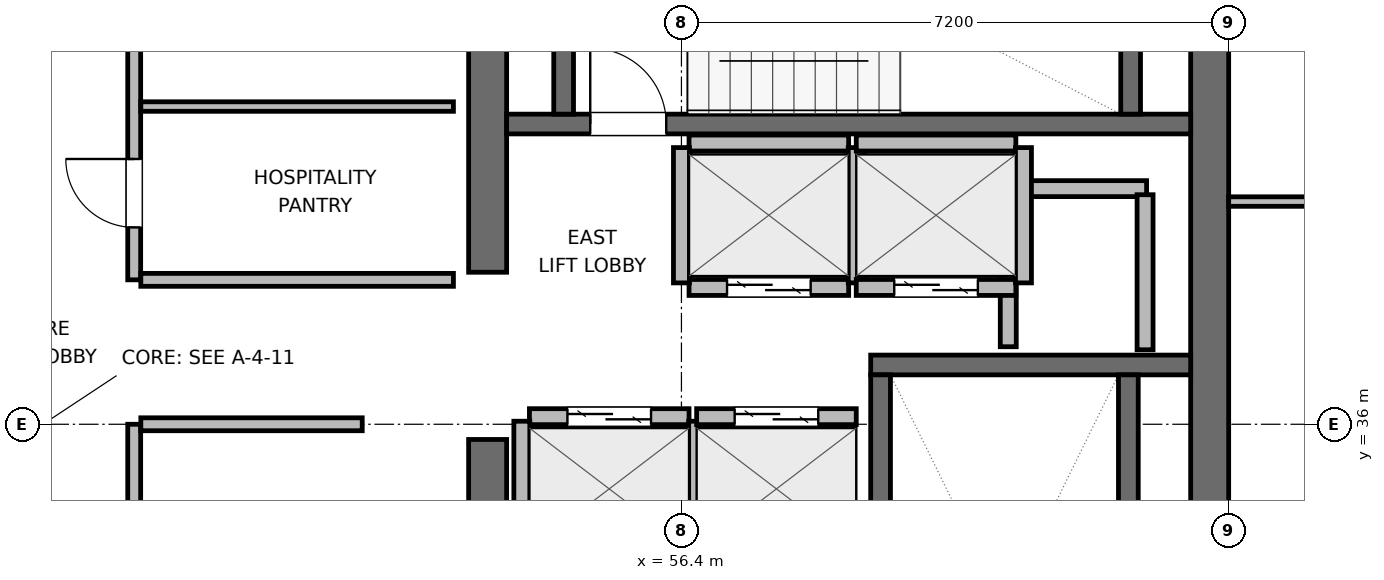
"""IFC4 building model, lengths in metres.
Left out: names, types, materials, properties, quantities, classifications, styles, units other than length and angle.
Written with IfcOpenShell. Run it as: python <this file> out.ifc"""

import sys

from ifc_helpers import new_model, si_unit, direction, frame, frame_2d, origin, place, context, subcontext, project, spatial, rectangle, extrude, element, fill, save


model = new_model("IFC4")
c1 = context("Model", 3, precision=1e-05, world=origin(), true_north=direction((0.0, 1.0)))
c2 = subcontext(c1, "Body", "Model", "MODEL_VIEW")
j1 = project(units=[si_unit("LENGTHUNIT", "METRE"), si_unit("PLANEANGLEUNIT", "RADIAN")], contexts=[c1])
p1 = place(None, origin())
s1 = spatial("IfcSite", under=j1, at=p1, CompositionType="ELEMENT")
p2 = place(p1, origin())
s2 = spatial("IfcBuilding", under=s1, at=p2, CompositionType="ELEMENT")
p3 = place(p2, frame((0.0, 0.0, 274.5)))
s3 = spatial("IfcBuildingStorey", under=s2, at=p3, CompositionType="ELEMENT", Elevation=274.5)
p4 = place(p3, frame((53.85, 27.85, 0.0), z_axis=(0.0, 0.0, 1.0), x_axis=(0.0, 1.0, 0.0)))
e1 = element("IfcWall", 1, at=p4, inside=s3, PredefinedType="SHEAR", context=c2, shape_type="SweptSolid", body=[
    extrude(rectangle(XDim=7.95, YDim=0.5, at=frame_2d((3.975, 0.0))), origin(), (0.0, 0.0, 1.0), 3.9),
])
p5 = place(p3, frame((53.85, 38.0, 0.0), z_axis=(0.0, 0.0, 1.0), x_axis=(0.0, 1.0, 0.0)))
e2 = element("IfcWall", 2, at=p5, inside=s3, PredefinedType="SHEAR", context=c2, shape_type="SweptSolid", body=[
    extrude(rectangle(XDim=6.15, YDim=0.5, at=frame_2d((3.075, 0.0))), origin(), (0.0, 0.0, 1.0), 3.9),
])
p6 = place(p3, frame((63.35, 27.6, 0.0), z_axis=(0.0, 0.0, 1.0), x_axis=(0.0, 1.0, 0.0)))
e3 = element("IfcWall", 3, at=p6, inside=s3, PredefinedType="SHEAR", context=c2, shape_type="SweptSolid", body=[
    extrude(rectangle(XDim=16.8, YDim=0.5, at=frame_2d((8.4, 0.0))), origin(), (0.0, 0.0, 1.0), 3.9),
])
p7 = place(p3, frame((58.89, 36.78, 0.0), z_axis=(0.0, 0.0, 1.0), x_axis=(1.0, 0.0, 0.0)))
e4 = element("IfcWall", 4, at=p7, inside=s3, PredefinedType="SHEAR", context=c2, shape_type="SweptSolid", body=[
    extrude(rectangle(XDim=4.21, YDim=0.26, at=frame_2d((2.105, 0.0))), origin(), (0.0, 0.0, 1.0), 3.9),
])
p8 = place(p3, frame((59.02, 29.05, 0.0), z_axis=(0.0, 0.0, 1.0), x_axis=(0.0, 1.0, 0.0)))
e5 = element("IfcWall", 5, at=p8, inside=s3, PredefinedType="SHEAR", context=c2, shape_type="SweptSolid", body=[
    extrude(rectangle(XDim=7.6, YDim=0.26, at=frame_2d((3.8, 0.0))), origin(), (0.0, 0.0, 1.0), 3.9),
])
p9 = place(p8, frame((0.3, 0.0, 0.0)))
e6 = element("IfcOpeningElement", 6, at=p9, cuts=e5, PredefinedType="OPENING", context=c2, shape_type="SweptSolid", body=[
    extrude(rectangle(XDim=1.0, YDim=2.04, at=frame_2d((0.5, 1.02))), frame((0.0, 0.14, 0.0), z_axis=(0.0, -1.0, 0.0), x_axis=(1.0, 0.0, 0.0)), (0.0, 0.0, 1.0), 0.28),
])
p10 = place(p3, frame((62.28, 29.05, 0.0), z_axis=(0.0, 0.0, 1.0), x_axis=(0.0, 1.0, 0.0)))
e7 = element("IfcWall", 7, at=p10, inside=s3, PredefinedType="SHEAR", context=c2, shape_type="SweptSolid", body=[
    extrude(rectangle(XDim=7.6, YDim=0.26, at=frame_2d((3.8, 0.0))), origin(), (0.0, 0.0, 1.0), 3.9),
])
p11 = place(p3, frame((54.1, 39.95, 0.0), z_axis=(0.0, 0.0, 1.0), x_axis=(1.0, 0.0, 0.0)))
e8 = element("IfcWall", 8, at=p11, inside=s3, PredefinedType="SHEAR", context=c2, shape_type="SweptSolid", body=[
    extrude(rectangle(XDim=9.0, YDim=0.26, at=frame_2d((4.5, 0.0))), origin(), (0.0, 0.0, 1.0), 3.9),
])
p12 = place(p11, frame((1.1, 0.0, 0.0)))
e9 = element("IfcOpeningElement", 9, at=p12, cuts=e8, PredefinedType="OPENING", context=c2, shape_type="SweptSolid", body=[
    extrude(rectangle(XDim=1.0, YDim=2.04, at=frame_2d((0.5, 1.02))), frame((0.0, 0.14, 0.0), z_axis=(0.0, -1.0, 0.0), x_axis=(1.0, 0.0, 0.0)), (0.0, 0.0, 1.0), 0.28),
])
for number, where, z_axis, x_axis in (
    (10, (54.85, 40.08, 0.0), (0.0, 0.0, 1.0), (0.0, 1.0, 0.0)),
    (11, (62.31, 40.08, 0.0), (0.0, 0.0, 1.0), (0.0, 1.0, 0.0)),
):
    element("IfcWall", number, at=place(p3, frame(where, z_axis=z_axis, x_axis=x_axis)), inside=s3, PredefinedType="SHEAR", context=c2, shape_type="SweptSolid", body=[
        extrude(rectangle(XDim=2.94, YDim=0.26, at=frame_2d((1.47, 0.0))), origin(), (0.0, 0.0, 1.0), 3.9),
    ])
p13 = place(p3, frame((60.72, 39.1, 0.0), z_axis=(0.0, 0.0, 1.0), x_axis=(1.0, 0.0, 0.0)))
e12 = element("IfcWall", 12, at=p13, inside=s3, PredefinedType="PARTITIONING", context=c2, shape_type="SweptSolid", body=[
    extrude(rectangle(XDim=1.8, YDim=0.21, at=frame_2d((0.9, 0.0))), origin(), (0.0, 0.0, 1.0), 3.68),
])
p14 = place(p3, frame((60.7, 37.02, 0.0), z_axis=(0.0, 0.0, 1.0), x_axis=(0.0, 1.0, 0.0)))
e13 = element("IfcWall", 13, at=p14, inside=s3, PredefinedType="PARTITIONING", context=c2, shape_type="SweptSolid", body=[
    extrude(rectangle(XDim=1.96, YDim=0.21, at=frame_2d((0.98, 0.0))), origin(), (0.0, 0.0, 1.0), 3.68),
])
p15 = place(p3, frame((62.5, 36.98, 0.0), z_axis=(0.0, 0.0, 1.0), x_axis=(0.0, 1.0, 0.0)))
e14 = element("IfcWall", 14, at=p15, inside=s3, PredefinedType="PARTITIONING", context=c2, shape_type="SweptSolid", body=[
    extrude(rectangle(XDim=2.04, YDim=0.21, at=frame_2d((1.02, 0.0))), origin(), (0.0, 0.0, 1.0), 3.68),
])
p16 = place(p3, frame((54.4, 36.1, 0.0), z_axis=(0.0, 0.0, 1.0), x_axis=(1.0, 0.0, 0.0)))
e15 = element("IfcWall", 15, at=p16, inside=s3, PredefinedType="PARTITIONING", context=c2, shape_type="SweptSolid", body=[
    extrude(rectangle(XDim=2.1, YDim=0.21, at=frame_2d((1.05, 0.0))), origin(), (0.0, 0.0, 1.0), 3.68),
])
p17 = place(p16, frame((0.5, 0.0, 0.0)))
e16 = element("IfcOpeningElement", 16, at=p17, cuts=e15, PredefinedType="OPENING", context=c2, shape_type="SweptSolid", body=[
    extrude(rectangle(XDim=1.1, YDim=2.04, at=frame_2d((0.55, 1.02))), frame((0.0, 0.115, 0.0), z_axis=(0.0, -1.0, 0.0), x_axis=(1.0, 0.0, 0.0)), (0.0, 0.0, 1.0), 0.23),
])
for number, where, z_axis, x_axis in (
    (17, (54.3, 34.26, 0.0), (0.0, 0.0, 1.0), (0.0, 1.0, 0.0)),
    (18, (56.6, 34.26, 0.0), (0.0, 0.0, 1.0), (0.0, 1.0, 0.0)),
):
    element("IfcWall", number, at=place(p3, frame(where, z_axis=z_axis, x_axis=x_axis)), inside=s3, PredefinedType="PARTITIONING", context=c2, shape_type="SweptSolid", body=[
        extrude(rectangle(XDim=1.78, YDim=0.21, at=frame_2d((0.89, 0.0))), origin(), (0.0, 0.0, 1.0), 3.68),
    ])
p18 = place(p3, frame((56.6, 36.1, 0.0), z_axis=(0.0, 0.0, 1.0), x_axis=(1.0, 0.0, 0.0)))
e19 = element("IfcWall", 19, at=p18, inside=s3, PredefinedType="PARTITIONING", context=c2, shape_type="SweptSolid", body=[
    extrude(rectangle(XDim=2.1, YDim=0.21, at=frame_2d((1.05, 0.0))), origin(), (0.0, 0.0, 1.0), 3.68),
])
p19 = place(p18, frame((0.5, 0.0, 0.0)))
e20 = element("IfcOpeningElement", 20, at=p19, cuts=e19, PredefinedType="OPENING", context=c2, shape_type="SweptSolid", body=[
    extrude(rectangle(XDim=1.1, YDim=2.04, at=frame_2d((0.55, 1.02))), frame((0.0, 0.115, 0.0), z_axis=(0.0, -1.0, 0.0), x_axis=(1.0, 0.0, 0.0)), (0.0, 0.0, 1.0), 0.23),
])
p20 = place(p3, frame((56.5, 37.8, 0.0), z_axis=(0.0, 0.0, 1.0), x_axis=(1.0, 0.0, 0.0)))
e21 = element("IfcWall", 21, at=p20, inside=s3, PredefinedType="PARTITIONING", context=c2, shape_type="SweptSolid", body=[
    extrude(rectangle(XDim=2.1, YDim=0.21, at=frame_2d((1.05, 0.0))), origin(), (0.0, 0.0, 1.0), 3.68),
])
p21 = place(p20, frame((0.5, 0.0, 0.0)))
e22 = element("IfcOpeningElement", 22, at=p21, cuts=e21, PredefinedType="OPENING", context=c2, shape_type="SweptSolid", body=[
    extrude(rectangle(XDim=1.1, YDim=2.04, at=frame_2d((0.55, 1.02))), frame((0.0, 0.115, 0.0), z_axis=(0.0, -1.0, 0.0), x_axis=(1.0, 0.0, 0.0)), (0.0, 0.0, 1.0), 0.23),
])
p22 = place(p3, frame((56.5, 39.7, 0.0), z_axis=(0.0, 0.0, 1.0), x_axis=(1.0, 0.0, 0.0)))
e23 = element("IfcWall", 23, at=p22, inside=s3, PredefinedType="PARTITIONING", context=c2, shape_type="SweptSolid", body=[
    extrude(rectangle(XDim=2.1, YDim=0.21, at=frame_2d((1.05, 0.0))), origin(), (0.0, 0.0, 1.0), 3.68),
])
for number, where, z_axis, x_axis in (
    (24, (56.4, 37.86, 0.0), (0.0, 0.0, 1.0), (0.0, 1.0, 0.0)),
    (25, (58.7, 37.86, 0.0), (0.0, 0.0, 1.0), (0.0, 1.0, 0.0)),
):
    element("IfcWall", number, at=place(p3, frame(where, z_axis=z_axis, x_axis=x_axis)), inside=s3, PredefinedType="PARTITIONING", context=c2, shape_type="SweptSolid", body=[
        extrude(rectangle(XDim=1.78, YDim=0.21, at=frame_2d((0.89, 0.0))), origin(), (0.0, 0.0, 1.0), 3.68),
    ])
p23 = place(p3, frame((58.7, 37.8, 0.0), z_axis=(0.0, 0.0, 1.0), x_axis=(1.0, 0.0, 0.0)))
e26 = element("IfcWall", 26, at=p23, inside=s3, PredefinedType="PARTITIONING", context=c2, shape_type="SweptSolid", body=[
    extrude(rectangle(XDim=2.1, YDim=0.21, at=frame_2d((1.05, 0.0))), origin(), (0.0, 0.0, 1.0), 3.68),
])
p24 = place(p23, frame((0.5, 0.0, 0.0)))
e27 = element("IfcOpeningElement", 27, at=p24, cuts=e26, PredefinedType="OPENING", context=c2, shape_type="SweptSolid", body=[
    extrude(rectangle(XDim=1.1, YDim=2.04, at=frame_2d((0.55, 1.02))), frame((0.0, 0.115, 0.0), z_axis=(0.0, -1.0, 0.0), x_axis=(1.0, 0.0, 0.0)), (0.0, 0.0, 1.0), 0.23),
])
p25 = place(p3, frame((58.7, 39.7, 0.0), z_axis=(0.0, 0.0, 1.0), x_axis=(1.0, 0.0, 0.0)))
e28 = element("IfcWall", 28, at=p25, inside=s3, PredefinedType="PARTITIONING", context=c2, shape_type="SweptSolid", body=[
    extrude(rectangle(XDim=2.1, YDim=0.21, at=frame_2d((1.05, 0.0))), origin(), (0.0, 0.0, 1.0), 3.68),
])
p26 = place(p3, frame((60.9, 37.86, 0.0), z_axis=(0.0, 0.0, 1.0), x_axis=(0.0, 1.0, 0.0)))
e29 = element("IfcWall", 29, at=p26, inside=s3, PredefinedType="PARTITIONING", context=c2, shape_type="SweptSolid", body=[
    extrude(rectangle(XDim=1.78, YDim=0.21, at=frame_2d((0.89, 0.0))), origin(), (0.0, 0.0, 1.0), 3.68),
])
p27 = place(p3, frame((49.2, 32.6, 0.0), z_axis=(0.0, 0.0, 1.0), x_axis=(0.0, 1.0, 0.0)))
e30 = element("IfcWall", 30, at=p27, inside=s3, PredefinedType="PARTITIONING", context=c2, shape_type="SweptSolid", body=[
    extrude(rectangle(XDim=3.4, YDim=0.17, at=frame_2d((1.7, 0.0))), origin(), (0.0, 0.0, 1.0), 3.68),
])
p28 = place(p27, frame((0.638, 0.0, 0.0)))
e31 = element("IfcOpeningElement", 31, at=p28, cuts=e30, PredefinedType="OPENING", context=c2, shape_type="SweptSolid", body=[
    extrude(rectangle(XDim=0.9, YDim=2.02, at=frame_2d((0.45, 1.01))), frame((0.0, 0.095, 0.0), z_axis=(0.0, -1.0, 0.0), x_axis=(1.0, 0.0, 0.0)), (0.0, 0.0, 1.0), 0.19),
])
p29 = place(p3, frame((49.287, 36.0, 0.0), z_axis=(0.0, 0.0, 1.0), x_axis=(1.0, 0.0, 0.0)))
e32 = element("IfcWall", 32, at=p29, inside=s3, PredefinedType="PARTITIONING", context=c2, shape_type="SweptSolid", body=[
    extrude(rectangle(XDim=2.913, YDim=0.17, at=frame_2d((1.457, 0.0))), origin(), (0.0, 0.0, 1.0), 3.68),
])
p30 = place(p3, frame((49.2, 37.9, 0.0), z_axis=(0.0, 0.0, 1.0), x_axis=(0.0, 1.0, 0.0)))
e33 = element("IfcWall", 33, at=p30, inside=s3, PredefinedType="PARTITIONING", context=c2, shape_type="SweptSolid", body=[
    extrude(rectangle(XDim=6.0, YDim=0.17, at=frame_2d((3.0, 0.0))), origin(), (0.0, 0.0, 1.0), 3.68),
])
p31 = place(p30, frame((0.69, 0.0, 0.0)))
e34 = element("IfcOpeningElement", 34, at=p31, cuts=e33, PredefinedType="OPENING", context=c2, shape_type="SweptSolid", body=[
    extrude(rectangle(XDim=0.9, YDim=2.02, at=frame_2d((0.45, 1.01))), frame((0.0, 0.095, 0.0), z_axis=(0.0, -1.0, 0.0), x_axis=(1.0, 0.0, 0.0)), (0.0, 0.0, 1.0), 0.19),
])
p32 = place(p30, frame((3.69, 0.0, 0.0)))
e35 = element("IfcOpeningElement", 35, at=p32, cuts=e33, PredefinedType="OPENING", context=c2, shape_type="SweptSolid", body=[
    extrude(rectangle(XDim=0.9, YDim=2.02, at=frame_2d((0.45, 1.01))), frame((0.0, 0.095, 0.0), z_axis=(0.0, -1.0, 0.0), x_axis=(1.0, 0.0, 0.0)), (0.0, 0.0, 1.0), 0.19),
])
p33 = place(p3, frame((49.287, 37.9, 0.0), z_axis=(0.0, 0.0, 1.0), x_axis=(1.0, 0.0, 0.0)))
e36 = element("IfcWall", 36, at=p33, inside=s3, PredefinedType="PARTITIONING", context=c2, shape_type="SweptSolid", body=[
    extrude(rectangle(XDim=4.113, YDim=0.17, at=frame_2d((2.056, 0.0))), origin(), (0.0, 0.0, 1.0), 3.68),
])
p34 = place(p3, frame((49.287, 40.18, 0.0), z_axis=(0.0, 0.0, 1.0), x_axis=(1.0, 0.0, 0.0)))
e37 = element("IfcWall", 37, at=p34, inside=s3, PredefinedType="PARTITIONING", context=c2, shape_type="SweptSolid", body=[
    extrude(rectangle(XDim=4.113, YDim=0.125, at=frame_2d((2.056, 0.0))), origin(), (0.0, 0.0, 1.0), 3.68),
])
p35 = place(p3, frame((63.6, 38.93, 0.0), z_axis=(0.0, 0.0, 1.0), x_axis=(1.0, 0.0, 0.0)))
e38 = element("IfcWall", 38, at=p35, inside=s3, PredefinedType="PARTITIONING", context=c2, shape_type="SweptSolid", body=[
    extrude(rectangle(XDim=4.845, YDim=0.125, at=frame_2d((2.422, 0.0))), origin(), (0.0, 0.0, 1.0), 3.68),
])
p36 = place(p35, frame((2.1, 0.0, 0.0)))
e39 = element("IfcOpeningElement", 39, at=p36, cuts=e38, PredefinedType="OPENING", context=c2, shape_type="SweptSolid", body=[
    extrude(rectangle(XDim=0.9, YDim=2.02, at=frame_2d((0.45, 1.01))), frame((0.0, 0.073, 0.0), z_axis=(0.0, -1.0, 0.0), x_axis=(1.0, 0.0, 0.0)), (0.0, 0.0, 1.0), 0.145),
])
p37 = place(p12, origin())
e40 = element("IfcDoor", 40, at=p37, inside=s3, OperationType="SINGLE_SWING_LEFT", PredefinedType="DOOR", context=c2, shape_type="SweptSolid", body=[
    extrude(rectangle(XDim=1.0, YDim=2.04, at=frame_2d((0.5, 1.02))), frame((0.0, 0.025, 0.0), z_axis=(0.0, -1.0, 0.0), x_axis=(1.0, 0.0, 0.0)), (0.0, 0.0, 1.0), 0.05),
])
fill(e9, e40)
p38 = place(p17, origin())
e41 = element("IfcDoor", 41, at=p38, inside=s3, OperationType="DOUBLE_DOOR_SLIDING", PredefinedType="DOOR", context=c2, shape_type="SweptSolid", body=[
    extrude(rectangle(XDim=1.1, YDim=2.04, at=frame_2d((0.55, 1.02))), frame((0.0, 0.025, 0.0), z_axis=(0.0, -1.0, 0.0), x_axis=(1.0, 0.0, 0.0)), (0.0, 0.0, 1.0), 0.05),
])
fill(e16, e41)
p39 = place(p19, origin())
e42 = element("IfcDoor", 42, at=p39, inside=s3, OperationType="DOUBLE_DOOR_SLIDING", PredefinedType="DOOR", context=c2, shape_type="SweptSolid", body=[
    extrude(rectangle(XDim=1.1, YDim=2.04, at=frame_2d((0.55, 1.02))), frame((0.0, 0.025, 0.0), z_axis=(0.0, -1.0, 0.0), x_axis=(1.0, 0.0, 0.0)), (0.0, 0.0, 1.0), 0.05),
])
fill(e20, e42)
p40 = place(p21, origin())
e43 = element("IfcDoor", 43, at=p40, inside=s3, OperationType="DOUBLE_DOOR_SLIDING", PredefinedType="DOOR", context=c2, shape_type="SweptSolid", body=[
    extrude(rectangle(XDim=1.1, YDim=2.04, at=frame_2d((0.55, 1.02))), frame((0.0, 0.025, 0.0), z_axis=(0.0, -1.0, 0.0), x_axis=(1.0, 0.0, 0.0)), (0.0, 0.0, 1.0), 0.05),
])
fill(e22, e43)
p41 = place(p24, origin())
e44 = element("IfcDoor", 44, at=p41, inside=s3, OperationType="DOUBLE_DOOR_SLIDING", PredefinedType="DOOR", context=c2, shape_type="SweptSolid", body=[
    extrude(rectangle(XDim=1.1, YDim=2.04, at=frame_2d((0.55, 1.02))), frame((0.0, 0.025, 0.0), z_axis=(0.0, -1.0, 0.0), x_axis=(1.0, 0.0, 0.0)), (0.0, 0.0, 1.0), 0.05),
])
fill(e27, e44)
p42 = place(p31, origin())
e45 = element("IfcDoor", 45, at=p42, inside=s3, OperationType="SINGLE_SWING_RIGHT", PredefinedType="DOOR", context=c2, shape_type="SweptSolid", body=[
    extrude(rectangle(XDim=0.9, YDim=2.02, at=frame_2d((0.45, 1.01))), frame((0.0, 0.025, 0.0), z_axis=(0.0, -1.0, 0.0), x_axis=(1.0, 0.0, 0.0)), (0.0, 0.0, 1.0), 0.05),
])
fill(e34, e45)
save(model, sys.argv[1])
